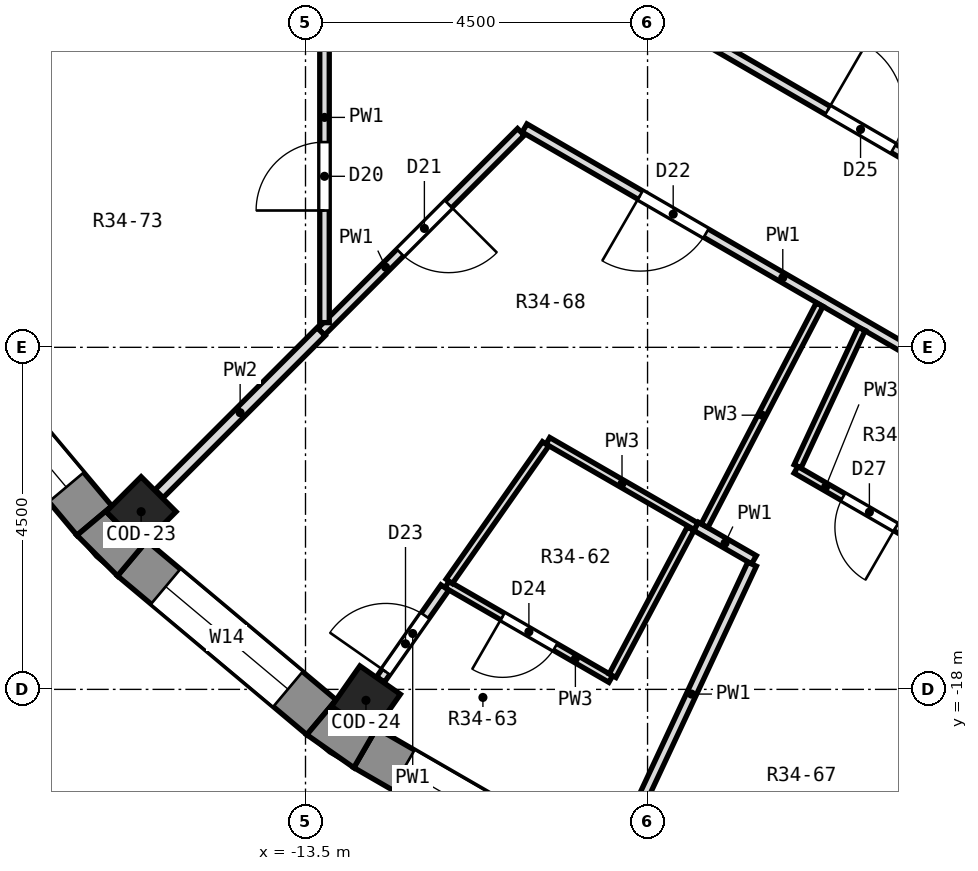
"""IFC4 building model, lengths in metres.
Left out: names, types, materials, properties, quantities, classifications, styles, units other than length and angle.
Written with IfcOpenShell. Run it as: python <this file> out.ifc"""

import sys

from ifc_helpers import new_model, si_unit, direction, frame, frame_2d, origin, origin_2d, place, context, subcontext, project, spatial, polyline, rectangle, outline, extrude, element, fill, save


model = new_model("IFC4")
c1 = context("Model", 3, precision=1e-05, world=origin(), true_north=direction((0.0, 1.0)))
c2 = subcontext(c1, "Body", "Model", "MODEL_VIEW")
j1 = project(units=[si_unit("LENGTHUNIT", "METRE"), si_unit("PLANEANGLEUNIT", "RADIAN")], contexts=[c1])
p1 = place(None, origin())
s1 = spatial("IfcSite", under=j1, at=p1, CompositionType="ELEMENT")
p2 = place(p1, origin())
s2 = spatial("IfcBuilding", under=s1, at=p2, CompositionType="ELEMENT")
p3 = place(p2, frame((0.0, 0.0, 239.6)))
s3 = spatial("IfcBuildingStorey", under=s2, at=p3, CompositionType="ELEMENT", Elevation=239.6)
for number, where, z_axis, x_axis in (
    (1, (-15.662, -15.662, 0.0), (0.0, 0.0, 1.0), (-0.707, -0.707, 0.0)),
    (2, (-12.705, -18.144, 0.0), (0.0, 0.0, 1.0), (-0.574, -0.819, 0.0)),
):
    element("IfcColumn", number, at=place(p3, frame(where, z_axis=z_axis, x_axis=x_axis)), inside=s3, PredefinedType="COLUMN", context=c2, shape_type="SweptSolid", body=[
        extrude(rectangle(XDim=0.65, YDim=0.65, at=origin_2d()), origin(), (0.0, 0.0, 1.0), 3.3),
    ])
p4 = place(p3, frame((-18.367, -13.29, 0.0), z_axis=(0.0, 0.0, 1.0), x_axis=(0.64277291405, -0.766056773982, 0.0)))
e3 = element("IfcWall", 3, at=p4, inside=s3, PredefinedType="SOLIDWALL", context=c2, shape_type="SweptSolid", body=[
    extrude(rectangle(XDim=3.252, YDim=0.6, at=frame_2d((1.626, 0.0))), origin(), (0.0, 0.0, 1.0), 2.9),
])
p5 = place(p4, frame((0.576, 0.0, 0.9)))
e4 = element("IfcOpeningElement", 4, at=p5, cuts=e3, PredefinedType="OPENING", context=c2, shape_type="SweptSolid", body=[
    extrude(rectangle(XDim=2.1, YDim=1.8, at=frame_2d((1.05, 0.9))), frame((0.0, 0.312, 0.0), z_axis=(0.0, -1.0, 0.0), x_axis=(1.0, 0.0, 0.0)), (0.0, 0.0, 1.0), 0.624),
])
p6 = place(p3, frame((-15.781, -16.277, 0.0), z_axis=(0.0, 0.0, 1.0), x_axis=(0.766056773982, -0.64277291405, 0.0)))
e5 = element("IfcWall", 5, at=p6, inside=s3, PredefinedType="SOLIDWALL", context=c2, shape_type="SweptSolid", body=[
    extrude(rectangle(XDim=3.252, YDim=0.6, at=frame_2d((1.626, 0.0))), origin(), (0.0, 0.0, 1.0), 2.9),
])
p7 = place(p6, frame((0.576, 0.0, 0.9)))
e6 = element("IfcOpeningElement", 6, at=p7, cuts=e5, PredefinedType="OPENING", context=c2, shape_type="SweptSolid", body=[
    extrude(rectangle(XDim=2.1, YDim=1.8, at=frame_2d((1.05, 0.9))), frame((0.0, 0.312, 0.0), z_axis=(0.0, -1.0, 0.0), x_axis=(1.0, 0.0, 0.0)), (0.0, 0.0, 1.0), 0.624),
])
p8 = place(p3, frame((-12.714, -18.77, 0.0), z_axis=(0.0, 0.0, 1.0), x_axis=(0.866016800201, -0.500014901547, 0.0)))
e7 = element("IfcWall", 7, at=p8, inside=s3, PredefinedType="SOLIDWALL", context=c2, shape_type="SweptSolid", body=[
    extrude(rectangle(XDim=3.252, YDim=0.6, at=frame_2d((1.626, 0.0))), origin(), (0.0, 0.0, 1.0), 2.9),
])
p9 = place(p8, frame((0.576, 0.0, 0.9)))
e8 = element("IfcOpeningElement", 8, at=p9, cuts=e7, PredefinedType="OPENING", context=c2, shape_type="SweptSolid", body=[
    extrude(rectangle(XDim=2.1, YDim=1.8, at=frame_2d((1.05, 0.9))), frame((0.0, 0.312, 0.0), z_axis=(0.0, -1.0, 0.0), x_axis=(1.0, 0.0, 0.0)), (0.0, 0.0, 1.0), 0.624),
])
p10 = place(p3, origin())
e9 = element("IfcWall", 9, at=p10, inside=s3, PredefinedType="SOLIDWALL", context=c2, shape_type="SweptSolid", body=[
    extrude(outline(polyline([(-15.973, -16.507), (-15.588, -16.047), (-15.662, -16.122), (-16.122, -15.662), (-16.047, -15.588), (-16.507, -15.973), (-15.973, -16.507)])), origin(), (0.0, 0.0, 1.0), 2.9),
])
p11 = place(p3, origin())
e10 = element("IfcWall", 10, at=p11, inside=s3, PredefinedType="SOLIDWALL", context=c2, shape_type="SweptSolid", body=[
    extrude(outline(polyline([(-12.864, -19.03), (-12.564, -18.51), (-12.625, -18.597), (-13.157, -18.224), (-13.097, -18.137), (-13.482, -18.597), (-12.864, -19.03)])), origin(), (0.0, 0.0, 1.0), 2.9),
])
p12 = place(p3, frame((-10.618, -10.615, 0.0), z_axis=(0.0, 0.0, 1.0), x_axis=(0.865323364785, -0.501214000561, 0.0)))
e11 = element("IfcWall", 11, at=p12, inside=s3, PredefinedType="PARTITIONING", context=c2, shape_type="SweptSolid", body=[
    extrude(rectangle(XDim=7.851, YDim=0.125, at=frame_2d((3.926, 0.0))), origin(), (0.0, 0.0, 1.0), 2.9),
])
p13 = place(p12, frame((1.76, 0.0, 0.0)))
e12 = element("IfcOpeningElement", 12, at=p13, cuts=e11, PredefinedType="OPENING", context=c2, shape_type="SweptSolid", body=[
    extrude(rectangle(XDim=1.0, YDim=2.1, at=frame_2d((0.5, 1.05))), frame((0.0, 0.074, 0.0), z_axis=(0.0, -1.0, 0.0), x_axis=(1.0, 0.0, 0.0)), (0.0, 0.0, 1.0), 0.149),
])
p14 = place(p3, frame((-8.953, -9.036, 0.0), z_axis=(0.0, 0.0, 1.0), x_axis=(0.865185064951, -0.501452693068, 0.0)))
e13 = element("IfcWall", 13, at=p14, inside=s3, PredefinedType="PARTITIONING", context=c2, shape_type="SweptSolid", body=[
    extrude(rectangle(XDim=6.609, YDim=0.125, at=frame_2d((3.304, 0.0))), origin(), (0.0, 0.0, 1.0), 2.9),
])
p15 = place(p14, frame((2.685, 0.0, 0.0)))
e14 = element("IfcOpeningElement", 14, at=p15, cuts=e13, PredefinedType="OPENING", context=c2, shape_type="SweptSolid", body=[
    extrude(rectangle(XDim=1.0, YDim=2.1, at=frame_2d((0.5, 1.05))), frame((0.0, 0.074, 0.0), z_axis=(0.0, -1.0, 0.0), x_axis=(1.0, 0.0, 0.0)), (0.0, 0.0, 1.0), 0.149),
])
p16 = place(p3, frame((-11.638, -16.62, 0.0), z_axis=(0.0, 0.0, 1.0), x_axis=(0.865981260576, -0.500076450486, 0.0)))
e15 = element("IfcWall", 15, at=p16, inside=s3, PredefinedType="PARTITIONING", context=c2, shape_type="SweptSolid", body=[
    extrude(rectangle(XDim=2.487, YDim=0.1, at=frame_2d((1.244, 0.0))), origin(), (0.0, 0.0, 1.0), 2.9),
])
p17 = place(p16, frame((0.844, 0.0, 0.0)))
e16 = element("IfcOpeningElement", 16, at=p17, cuts=e15, PredefinedType="OPENING", context=c2, shape_type="SweptSolid", body=[
    extrude(rectangle(XDim=0.8, YDim=2.1, at=frame_2d((0.4, 1.05))), frame((0.0, 0.062, 0.0), z_axis=(0.0, -1.0, 0.0), x_axis=(1.0, 0.0, 0.0)), (0.0, 0.0, 1.0), 0.124),
])
p18 = place(p3, frame((-10.311, -14.73, 0.0), z_axis=(0.0, 0.0, 1.0), x_axis=(0.866073680794, -0.499916372443, 0.0)))
e17 = element("IfcWall", 17, at=p18, inside=s3, PredefinedType="PARTITIONING", context=c2, shape_type="SweptSolid", body=[
    extrude(rectangle(XDim=2.252, YDim=0.1, at=frame_2d((1.126, 0.0))), origin(), (0.0, 0.0, 1.0), 2.9),
])
p19 = place(p3, frame((-8.361, -15.856, 0.0), z_axis=(0.0, 0.0, 1.0), x_axis=(0.865838315616, -0.500323906295, 0.0)))
e18 = element("IfcWall", 18, at=p19, inside=s3, PredefinedType="PARTITIONING", context=c2, shape_type="SweptSolid", body=[
    extrude(rectangle(XDim=0.878, YDim=0.125, at=frame_2d((0.439, 0.0))), origin(), (0.0, 0.0, 1.0), 2.9),
])
p20 = place(p3, frame((-7.047, -15.111, 0.0), z_axis=(0.0, 0.0, 1.0), x_axis=(0.866015874633, -0.500016504612, 0.0)))
e19 = element("IfcWall", 19, at=p20, inside=s3, PredefinedType="PARTITIONING", context=c2, shape_type="SweptSolid", body=[
    extrude(rectangle(XDim=2.228, YDim=0.1, at=frame_2d((1.114, 0.0))), origin(), (0.0, 0.0, 1.0), 2.9),
])
p21 = place(p20, frame((0.715, 0.0, 0.0)))
e20 = element("IfcOpeningElement", 20, at=p21, cuts=e19, PredefinedType="OPENING", context=c2, shape_type="SweptSolid", body=[
    extrude(rectangle(XDim=0.8, YDim=2.1, at=frame_2d((0.4, 1.05))), frame((0.0, 0.062, 0.0), z_axis=(0.0, -1.0, 0.0), x_axis=(1.0, 0.0, 0.0)), (0.0, 0.0, 1.0), 0.124),
])
p22 = place(p3, frame((-13.294, -13.294, 0.0), z_axis=(0.0, 0.0, 1.0), x_axis=(0.707106781187, 0.707106781187, 0.0)))
e21 = element("IfcWall", 21, at=p22, inside=s3, PredefinedType="PARTITIONING", context=c2, shape_type="SweptSolid", body=[
    extrude(rectangle(XDim=3.717, YDim=0.125, at=frame_2d((1.858, 0.0))), origin(), (0.0, 0.0, 1.0), 2.9),
])
p23 = place(p22, frame((1.471, 0.0, 0.0)))
e22 = element("IfcOpeningElement", 22, at=p23, cuts=e21, PredefinedType="OPENING", context=c2, shape_type="SweptSolid", body=[
    extrude(rectangle(XDim=0.9, YDim=2.1, at=frame_2d((0.45, 1.05))), frame((0.0, 0.074, 0.0), z_axis=(0.0, -1.0, 0.0), x_axis=(1.0, 0.0, 0.0)), (0.0, 0.0, 1.0), 0.149),
])
p24 = place(p3, frame((-15.426, -15.426, 0.0), z_axis=(0.0, 0.0, 1.0), x_axis=(0.707106781187, 0.707106781187, 0.0)))
e23 = element("IfcWall", 23, at=p24, inside=s3, PredefinedType="PARTITIONING", context=c2, shape_type="SweptSolid", body=[
    extrude(rectangle(XDim=3.014, YDim=0.15, at=frame_2d((1.507, 0.0))), origin(), (0.0, 0.0, 1.0), 2.9),
])
p25 = place(p3, frame((-11.609, -16.579, 0.0), z_axis=(0.0, 0.0, 1.0), x_axis=(0.574033341126, 0.818831926146, 0.0)))
e24 = element("IfcWall", 24, at=p25, inside=s3, PredefinedType="PARTITIONING", context=c2, shape_type="SweptSolid", body=[
    extrude(rectangle(XDim=2.209, YDim=0.1, at=frame_2d((1.104, 0.0))), origin(), (0.0, 0.0, 1.0), 2.9),
])
p26 = place(p3, frame((-12.513, -17.87, 0.0), z_axis=(0.0, 0.0, 1.0), x_axis=(0.573384599987, 0.819286336086, 0.0)))
e25 = element("IfcWall", 25, at=p26, inside=s3, PredefinedType="PARTITIONING", context=c2, shape_type="SweptSolid", body=[
    extrude(rectangle(XDim=1.475, YDim=0.125, at=frame_2d((0.738, 0.0))), origin(), (0.0, 0.0, 1.0), 2.9),
])
p27 = place(p26, frame((0.123, 0.0, 0.0)))
e26 = element("IfcOpeningElement", 26, at=p27, cuts=e25, PredefinedType="OPENING", context=c2, shape_type="SweptSolid", body=[
    extrude(rectangle(XDim=0.9, YDim=2.1, at=frame_2d((0.45, 1.05))), frame((0.0, 0.074, 0.0), z_axis=(0.0, -1.0, 0.0), x_axis=(1.0, 0.0, 0.0)), (0.0, 0.0, 1.0), 0.149),
])
p28 = place(p3, frame((-9.46, -17.82, 0.0), z_axis=(0.0, 0.0, 1.0), x_axis=(0.469111743442, 0.883138818174, 0.0)))
e27 = element("IfcWall", 27, at=p28, inside=s3, PredefinedType="PARTITIONING", context=c2, shape_type="SweptSolid", body=[
    extrude(rectangle(XDim=2.189, YDim=0.1, at=frame_2d((1.095, 0.0))), origin(), (0.0, 0.0, 1.0), 2.9),
])
p29 = place(p3, frame((-8.25, -15.847, 0.0), z_axis=(0.0, 0.0, 1.0), x_axis=(0.461751333764, 0.887009416955, 0.0)))
e28 = element("IfcWall", 28, at=p29, inside=s3, PredefinedType="PARTITIONING", context=c2, shape_type="SweptSolid", body=[
    extrude(rectangle(XDim=3.278, YDim=0.1, at=frame_2d((1.639, 0.0))), origin(), (0.0, 0.0, 1.0), 2.9),
])
p30 = place(p3, frame((-9.22, -19.771, 0.0), z_axis=(0.0, 0.0, 1.0), x_axis=(0.422998854506, 0.906130216408, 0.0)))
e29 = element("IfcWall", 29, at=p30, inside=s3, PredefinedType="PARTITIONING", context=c2, shape_type="SweptSolid", body=[
    extrude(rectangle(XDim=3.772, YDim=0.125, at=frame_2d((1.886, 0.0))), origin(), (0.0, 0.0, 1.0), 2.9),
])
p31 = place(p3, frame((-7.026, -15.066, 0.0), z_axis=(0.0, 0.0, 1.0), x_axis=(0.422771582019, 0.906236276827, 0.0)))
e30 = element("IfcWall", 30, at=p31, inside=s3, PredefinedType="PARTITIONING", context=c2, shape_type="SweptSolid", body=[
    extrude(rectangle(XDim=1.995, YDim=0.1, at=frame_2d((0.998, 0.0))), origin(), (0.0, 0.0, 1.0), 2.9),
])
p32 = place(p3, frame((-13.25, -13.175, 0.0), z_axis=(0.0, 0.0, 1.0), x_axis=(0.0, 1.0, 0.0)))
e31 = element("IfcWall", 31, at=p32, inside=s3, PredefinedType="PARTITIONING", context=c2, shape_type="SweptSolid", body=[
    extrude(rectangle(XDim=3.925, YDim=0.125, at=frame_2d((1.962, 0.0))), origin(), (0.0, 0.0, 1.0), 2.9),
])
p33 = place(p32, frame((1.475, 0.0, 0.0)))
e32 = element("IfcOpeningElement", 32, at=p33, cuts=e31, PredefinedType="OPENING", context=c2, shape_type="SweptSolid", body=[
    extrude(rectangle(XDim=0.9, YDim=2.1, at=frame_2d((0.45, 1.05))), frame((0.0, 0.074, 0.0), z_axis=(0.0, -1.0, 0.0), x_axis=(1.0, 0.0, 0.0)), (0.0, 0.0, 1.0), 0.149),
])
p34 = place(p5, origin())
e33 = element("IfcWindow", 33, at=p34, inside=s3, PartitioningType="SINGLE_PANEL", PredefinedType="WINDOW", context=c2, shape_type="SweptSolid", body=[
    extrude(rectangle(XDim=2.1, YDim=1.8, at=frame_2d((1.05, 0.9))), frame((0.0, 0.18, 0.0), z_axis=(0.0, -1.0, 0.0), x_axis=(1.0, 0.0, 0.0)), (0.0, 0.0, 1.0), 0.06),
])
fill(e4, e33)
p35 = place(p7, origin())
e34 = element("IfcWindow", 34, at=p35, inside=s3, PartitioningType="SINGLE_PANEL", PredefinedType="WINDOW", context=c2, shape_type="SweptSolid", body=[
    extrude(rectangle(XDim=2.1, YDim=1.8, at=frame_2d((1.05, 0.9))), frame((0.0, 0.18, 0.0), z_axis=(0.0, -1.0, 0.0), x_axis=(1.0, 0.0, 0.0)), (0.0, 0.0, 1.0), 0.06),
])
fill(e6, e34)
p36 = place(p9, origin())
e35 = element("IfcWindow", 35, at=p36, inside=s3, PartitioningType="SINGLE_PANEL", PredefinedType="WINDOW", context=c2, shape_type="SweptSolid", body=[
    extrude(rectangle(XDim=2.1, YDim=1.8, at=frame_2d((1.05, 0.9))), frame((0.0, 0.18, 0.0), z_axis=(0.0, -1.0, 0.0), x_axis=(1.0, 0.0, 0.0)), (0.0, 0.0, 1.0), 0.06),
])
fill(e8, e35)
p37 = place(p33, origin())
e36 = element("IfcDoor", 36, at=p37, inside=s3, OperationType="SINGLE_SWING_LEFT", PredefinedType="DOOR", context=c2, shape_type="SweptSolid", body=[
    extrude(rectangle(XDim=0.9, YDim=2.1, at=frame_2d((0.45, 1.05))), frame((0.0, 0.025, 0.0), z_axis=(0.0, -1.0, 0.0), x_axis=(1.0, 0.0, 0.0)), (0.0, 0.0, 1.0), 0.05),
])
fill(e32, e36)
p38 = place(p23, frame((0.9, 0.0, 0.0), z_axis=(0.0, 0.0, 1.0), x_axis=(-1.0, 0.0, 0.0)))
e37 = element("IfcDoor", 37, at=p38, inside=s3, OperationType="SINGLE_SWING_LEFT", PredefinedType="DOOR", context=c2, shape_type="SweptSolid", body=[
    extrude(rectangle(XDim=0.9, YDim=2.1, at=frame_2d((0.45, 1.05))), frame((0.0, 0.025, 0.0), z_axis=(0.0, -1.0, 0.0), x_axis=(1.0, 0.0, 0.0)), (0.0, 0.0, 1.0), 0.05),
])
fill(e22, e37)
p39 = place(p13, frame((1.0, 0.0, 0.0), z_axis=(0.0, 0.0, 1.0), x_axis=(-1.0, 0.0, 0.0)))
e38 = element("IfcDoor", 38, at=p39, inside=s3, OperationType="SINGLE_SWING_RIGHT", PredefinedType="DOOR", context=c2, shape_type="SweptSolid", body=[
    extrude(rectangle(XDim=1.0, YDim=2.1, at=frame_2d((0.5, 1.05))), frame((0.0, 0.025, 0.0), z_axis=(0.0, -1.0, 0.0), x_axis=(1.0, 0.0, 0.0)), (0.0, 0.0, 1.0), 0.05),
])
fill(e12, e38)
p40 = place(p27, origin())
e39 = element("IfcDoor", 39, at=p40, inside=s3, OperationType="SINGLE_SWING_LEFT", PredefinedType="DOOR", context=c2, shape_type="SweptSolid", body=[
    extrude(rectangle(XDim=0.9, YDim=2.1, at=frame_2d((0.45, 1.05))), frame((0.0, 0.025, 0.0), z_axis=(0.0, -1.0, 0.0), x_axis=(1.0, 0.0, 0.0)), (0.0, 0.0, 1.0), 0.05),
])
fill(e26, e39)
p41 = place(p17, frame((0.8, 0.0, 0.0), z_axis=(0.0, 0.0, 1.0), x_axis=(-1.0, 0.0, 0.0)))
e40 = element("IfcDoor", 40, at=p41, inside=s3, OperationType="SINGLE_SWING_RIGHT", PredefinedType="DOOR", context=c2, shape_type="SweptSolid", body=[
    extrude(rectangle(XDim=0.8, YDim=2.1, at=frame_2d((0.4, 1.05))), frame((0.0, 0.025, 0.0), z_axis=(0.0, -1.0, 0.0), x_axis=(1.0, 0.0, 0.0)), (0.0, 0.0, 1.0), 0.05),
])
fill(e16, e40)
p42 = place(p15, origin())
e41 = element("IfcDoor", 41, at=p42, inside=s3, OperationType="SINGLE_SWING_LEFT", PredefinedType="DOOR", context=c2, shape_type="SweptSolid", body=[
    extrude(rectangle(XDim=1.0, YDim=2.1, at=frame_2d((0.5, 1.05))), frame((0.0, 0.025, 0.0), z_axis=(0.0, -1.0, 0.0), x_axis=(1.0, 0.0, 0.0)), (0.0, 0.0, 1.0), 0.05),
])
fill(e14, e41)
p43 = place(p21, frame((0.8, 0.0, 0.0), z_axis=(0.0, 0.0, 1.0), x_axis=(-1.0, 0.0, 0.0)))
e42 = element("IfcDoor", 42, at=p43, inside=s3, OperationType="SINGLE_SWING_LEFT", PredefinedType="DOOR", context=c2, shape_type="SweptSolid", body=[
    extrude(rectangle(XDim=0.8, YDim=2.1, at=frame_2d((0.4, 1.05))), frame((0.0, 0.025, 0.0), z_axis=(0.0, -1.0, 0.0), x_axis=(1.0, 0.0, 0.0)), (0.0, 0.0, 1.0), 0.05),
])
fill(e20, e42)
save(model, sys.argv[1])
